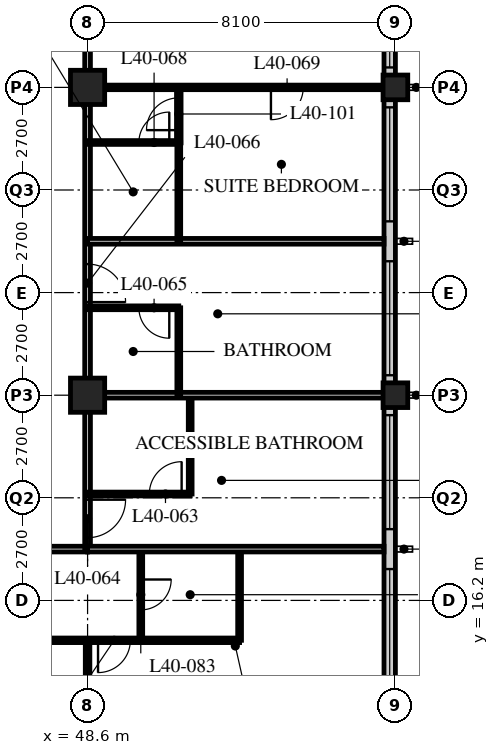
"""IFC4 building model, lengths in metres.
Left out: names, types, materials, properties, quantities, classifications, styles, units other than length and angle.
Written with IfcOpenShell. Run it as: python <this file> out.ifc"""

import sys

from ifc_helpers import new_model, si_unit, direction, frame, frame_2d, origin, origin_2d, place, context, subcontext, project, spatial, rectangle, hollow_rectangle, extrude, element, fill, save


model = new_model("IFC4")
c1 = context("Model", 3, precision=1e-05, world=origin(), true_north=direction((0.0, 1.0)))
c2 = subcontext(c1, "Body", "Model", "MODEL_VIEW")
j1 = project(units=[si_unit("LENGTHUNIT", "METRE"), si_unit("PLANEANGLEUNIT", "RADIAN")], contexts=[c1])
p1 = place(None, origin())
s1 = spatial("IfcSite", under=j1, at=p1, CompositionType="ELEMENT")
p2 = place(p1, origin())
s2 = spatial("IfcBuilding", under=s1, at=p2, CompositionType="ELEMENT")
p3 = place(p2, frame((0.0, 0.0, 154.4)))
s3 = spatial("IfcBuildingStorey", under=s2, at=p3, CompositionType="ELEMENT", Elevation=154.4)
for number, where, z_axis, x_axis in (
    (1, (48.6, 21.6, 0.0), (0.0, 0.0, 1.0), (1.0, 0.0, 0.0)),
    (2, (48.6, 29.7, 0.0), (0.0, 0.0, 1.0), (1.0, 0.0, 0.0)),
):
    element("IfcColumn", number, at=place(p3, frame(where, z_axis=z_axis, x_axis=x_axis)), inside=s3, PredefinedType="COLUMN", context=c2, shape_type="SweptSolid", body=[
        extrude(hollow_rectangle(XDim=0.9, YDim=0.9, WallThickness=0.1, at=origin_2d()), origin(), (0.0, 0.0, 1.0), 3.4),
    ])
for number, where, z_axis, x_axis in (
    (3, (56.7, 21.6, 0.0), (0.0, 0.0, 1.0), (1.0, 0.0, 0.0)),
    (4, (56.7, 29.7, 0.0), (0.0, 0.0, 1.0), (1.0, 0.0, 0.0)),
):
    element("IfcColumn", number, at=place(p3, frame(where, z_axis=z_axis, x_axis=x_axis)), inside=s3, PredefinedType="COLUMN", context=c2, shape_type="SweptSolid", body=[
        extrude(hollow_rectangle(XDim=0.65, YDim=0.65, WallThickness=0.055, at=origin_2d()), origin(), (0.0, 0.0, 1.0), 3.4),
    ])
p4 = place(p3, frame((56.55, 13.8, 0.0), z_axis=(0.0, 0.0, 1.0), x_axis=(0.0, 1.0, 0.0)))
e5 = element("IfcWall", 5, at=p4, inside=s3, PredefinedType="SOLIDWALL", context=c2, shape_type="SweptSolid", body=[
    extrude(rectangle(XDim=32.1, YDim=0.3, at=frame_2d((16.05, 0.0))), origin(), (0.0, 0.0, 1.0), 2.15),
])
p5 = place(p4, frame((0.225, 0.0, 0.9)))
e6 = element("IfcOpeningElement", 6, at=p5, cuts=e5, PredefinedType="OPENING", context=c2, shape_type="SweptSolid", body=[
    extrude(rectangle(XDim=3.0, YDim=1.2, at=frame_2d((1.5, 0.6))), frame((0.0, 0.16, 0.0), z_axis=(0.0, -1.0, 0.0), x_axis=(1.0, 0.0, 0.0)), (0.0, 0.0, 1.0), 0.32),
])
p6 = place(p4, frame((4.275, 0.0, 0.9)))
e7 = element("IfcOpeningElement", 7, at=p6, cuts=e5, PredefinedType="OPENING", context=c2, shape_type="SweptSolid", body=[
    extrude(rectangle(XDim=3.0, YDim=1.2, at=frame_2d((1.5, 0.6))), frame((0.0, 0.16, 0.0), z_axis=(0.0, -1.0, 0.0), x_axis=(1.0, 0.0, 0.0)), (0.0, 0.0, 1.0), 0.32),
])
p7 = place(p4, frame((8.325, 0.0, 0.9)))
e8 = element("IfcOpeningElement", 8, at=p7, cuts=e5, PredefinedType="OPENING", context=c2, shape_type="SweptSolid", body=[
    extrude(rectangle(XDim=3.0, YDim=1.2, at=frame_2d((1.5, 0.6))), frame((0.0, 0.16, 0.0), z_axis=(0.0, -1.0, 0.0), x_axis=(1.0, 0.0, 0.0)), (0.0, 0.0, 1.0), 0.32),
])
p8 = place(p4, frame((12.375, 0.0, 0.9)))
e9 = element("IfcOpeningElement", 9, at=p8, cuts=e5, PredefinedType="OPENING", context=c2, shape_type="SweptSolid", body=[
    extrude(rectangle(XDim=3.0, YDim=1.2, at=frame_2d((1.5, 0.6))), frame((0.0, 0.16, 0.0), z_axis=(0.0, -1.0, 0.0), x_axis=(1.0, 0.0, 0.0)), (0.0, 0.0, 1.0), 0.32),
])
p9 = place(p4, frame((16.425, 0.0, 0.9)))
e10 = element("IfcOpeningElement", 10, at=p9, cuts=e5, PredefinedType="OPENING", context=c2, shape_type="SweptSolid", body=[
    extrude(rectangle(XDim=3.0, YDim=1.2, at=frame_2d((1.5, 0.6))), frame((0.0, 0.16, 0.0), z_axis=(0.0, -1.0, 0.0), x_axis=(1.0, 0.0, 0.0)), (0.0, 0.0, 1.0), 0.32),
])
p10 = place(p4, frame((20.475, 0.0, 0.9)))
e11 = element("IfcOpeningElement", 11, at=p10, cuts=e5, PredefinedType="OPENING", context=c2, shape_type="SweptSolid", body=[
    extrude(rectangle(XDim=3.0, YDim=1.2, at=frame_2d((1.5, 0.6))), frame((0.0, 0.16, 0.0), z_axis=(0.0, -1.0, 0.0), x_axis=(1.0, 0.0, 0.0)), (0.0, 0.0, 1.0), 0.32),
])
p11 = place(p4, frame((24.525, 0.0, 0.9)))
e12 = element("IfcOpeningElement", 12, at=p11, cuts=e5, PredefinedType="OPENING", context=c2, shape_type="SweptSolid", body=[
    extrude(rectangle(XDim=3.0, YDim=1.2, at=frame_2d((1.5, 0.6))), frame((0.0, 0.16, 0.0), z_axis=(0.0, -1.0, 0.0), x_axis=(1.0, 0.0, 0.0)), (0.0, 0.0, 1.0), 0.32),
])
p12 = place(p4, frame((28.575, 0.0, 0.9)))
e13 = element("IfcOpeningElement", 13, at=p12, cuts=e5, PredefinedType="OPENING", context=c2, shape_type="SweptSolid", body=[
    extrude(rectangle(XDim=3.0, YDim=1.2, at=frame_2d((1.5, 0.6))), frame((0.0, 0.16, 0.0), z_axis=(0.0, -1.0, 0.0), x_axis=(1.0, 0.0, 0.0)), (0.0, 0.0, 1.0), 0.32),
])
p13 = place(p3, frame((8.1, 17.55, 0.0), z_axis=(0.0, 0.0, 1.0), x_axis=(1.0, 0.0, 0.0)))
e14 = element("IfcWall", 14, at=p13, inside=s3, PredefinedType="PARTITIONING", context=c2, shape_type="SweptSolid", body=[
    extrude(rectangle(XDim=40.5, YDim=0.15, at=frame_2d((20.25, 0.0))), origin(), (0.0, 0.0, 1.0), 3.15),
])
p14 = place(p13, frame((10.0, 0.0, 0.0)))
e15 = element("IfcOpeningElement", 15, at=p14, cuts=e14, PredefinedType="OPENING", context=c2, shape_type="SweptSolid", body=[
    extrude(rectangle(XDim=1.0, YDim=2.1, at=frame_2d((0.5, 1.05))), frame((0.0, 0.085, 0.0), z_axis=(0.0, -1.0, 0.0), x_axis=(1.0, 0.0, 0.0)), (0.0, 0.0, 1.0), 0.17),
])
p15 = place(p13, frame((22.15, 0.0, 0.0)))
e16 = element("IfcOpeningElement", 16, at=p15, cuts=e14, PredefinedType="OPENING", context=c2, shape_type="SweptSolid", body=[
    extrude(rectangle(XDim=1.0, YDim=2.1, at=frame_2d((0.5, 1.05))), frame((0.0, 0.085, 0.0), z_axis=(0.0, -1.0, 0.0), x_axis=(1.0, 0.0, 0.0)), (0.0, 0.0, 1.0), 0.17),
])
p16 = place(p13, frame((30.8, 0.0, 0.0)))
e17 = element("IfcOpeningElement", 17, at=p16, cuts=e14, PredefinedType="OPENING", context=c2, shape_type="SweptSolid", body=[
    extrude(rectangle(XDim=1.0, YDim=2.1, at=frame_2d((0.5, 1.05))), frame((0.0, 0.085, 0.0), z_axis=(0.0, -1.0, 0.0), x_axis=(1.0, 0.0, 0.0)), (0.0, 0.0, 1.0), 0.17),
])
p17 = place(p13, frame((34.85, 0.0, 0.0)))
e18 = element("IfcOpeningElement", 18, at=p17, cuts=e14, PredefinedType="OPENING", context=c2, shape_type="SweptSolid", body=[
    extrude(rectangle(XDim=1.0, YDim=2.1, at=frame_2d((0.5, 1.05))), frame((0.0, 0.085, 0.0), z_axis=(0.0, -1.0, 0.0), x_axis=(1.0, 0.0, 0.0)), (0.0, 0.0, 1.0), 0.17),
])
p18 = place(p13, frame((1.525, 0.0, 0.0)))
e19 = element("IfcOpeningElement", 19, at=p18, cuts=e14, PredefinedType="OPENING", context=c2, shape_type="SweptSolid", body=[
    extrude(rectangle(XDim=1.0, YDim=2.1, at=frame_2d((0.5, 1.05))), frame((0.0, 0.085, 0.0), z_axis=(0.0, -1.0, 0.0), x_axis=(1.0, 0.0, 0.0)), (0.0, 0.0, 1.0), 0.17),
])
p19 = place(p13, frame((37.975, 0.0, 0.0)))
e20 = element("IfcOpeningElement", 20, at=p19, cuts=e14, PredefinedType="OPENING", context=c2, shape_type="SweptSolid", body=[
    extrude(rectangle(XDim=1.0, YDim=2.1, at=frame_2d((0.5, 1.05))), frame((0.0, 0.085, 0.0), z_axis=(0.0, -1.0, 0.0), x_axis=(1.0, 0.0, 0.0)), (0.0, 0.0, 1.0), 0.17),
])
p20 = place(p3, frame((48.6, 17.55, 0.0), z_axis=(0.0, 0.0, 1.0), x_axis=(0.0, 1.0, 0.0)))
e21 = element("IfcWall", 21, at=p20, inside=s3, PredefinedType="PARTITIONING", context=c2, shape_type="SweptSolid", body=[
    extrude(rectangle(XDim=28.35, YDim=0.15, at=frame_2d((14.175, 0.0))), origin(), (0.0, 0.0, 1.0), 2.15),
])
p21 = place(p20, frame((0.3, 0.0, 0.0)))
e22 = element("IfcOpeningElement", 22, at=p21, cuts=e21, PredefinedType="OPENING", context=c2, shape_type="SweptSolid", body=[
    extrude(rectangle(XDim=1.0, YDim=2.1, at=frame_2d((0.5, 1.05))), frame((0.0, 0.085, 0.0), z_axis=(0.0, -1.0, 0.0), x_axis=(1.0, 0.0, 0.0)), (0.0, 0.0, 1.0), 0.17),
])
p22 = place(p20, frame((6.5, 0.0, 0.0)))
e23 = element("IfcOpeningElement", 23, at=p22, cuts=e21, PredefinedType="OPENING", context=c2, shape_type="SweptSolid", body=[
    extrude(rectangle(XDim=1.0, YDim=2.1, at=frame_2d((0.5, 1.05))), frame((0.0, 0.085, 0.0), z_axis=(0.0, -1.0, 0.0), x_axis=(1.0, 0.0, 0.0)), (0.0, 0.0, 1.0), 0.17),
])
p23 = place(p20, frame((13.675, 0.0, 0.0)))
e24 = element("IfcOpeningElement", 24, at=p23, cuts=e21, PredefinedType="OPENING", context=c2, shape_type="SweptSolid", body=[
    extrude(rectangle(XDim=1.0, YDim=2.1, at=frame_2d((0.5, 1.05))), frame((0.0, 0.085, 0.0), z_axis=(0.0, -1.0, 0.0), x_axis=(1.0, 0.0, 0.0)), (0.0, 0.0, 1.0), 0.17),
])
p24 = place(p20, frame((22.7, 0.0, 0.0)))
e25 = element("IfcOpeningElement", 25, at=p24, cuts=e21, PredefinedType="OPENING", context=c2, shape_type="SweptSolid", body=[
    extrude(rectangle(XDim=1.0, YDim=2.1, at=frame_2d((0.5, 1.05))), frame((0.0, 0.085, 0.0), z_axis=(0.0, -1.0, 0.0), x_axis=(1.0, 0.0, 0.0)), (0.0, 0.0, 1.0), 0.17),
])
p25 = place(p20, frame((24.9, 0.0, 0.0)))
e26 = element("IfcOpeningElement", 26, at=p25, cuts=e21, PredefinedType="OPENING", context=c2, shape_type="SweptSolid", body=[
    extrude(rectangle(XDim=1.0, YDim=2.1, at=frame_2d((0.5, 1.05))), frame((0.0, 0.085, 0.0), z_axis=(0.0, -1.0, 0.0), x_axis=(1.0, 0.0, 0.0)), (0.0, 0.0, 1.0), 0.17),
])
p26 = place(p3, frame((51.3, 19.0, 0.0), z_axis=(0.0, 0.0, 1.0), x_axis=(0.0, 1.0, 0.0)))
e27 = element("IfcWall", 27, at=p26, inside=s3, PredefinedType="PARTITIONING", context=c2, shape_type="SweptSolid", body=[
    extrude(rectangle(XDim=2.6, YDim=0.1, at=frame_2d((1.3, 0.0))), origin(), (0.0, 0.0, 1.0), 3.15),
])
p27 = place(p3, frame((48.6, 19.0, 0.0), z_axis=(0.0, 0.0, 1.0), x_axis=(1.0, 0.0, 0.0)))
e28 = element("IfcWall", 28, at=p27, inside=s3, PredefinedType="PARTITIONING", context=c2, shape_type="SweptSolid", body=[
    extrude(rectangle(XDim=2.7, YDim=0.1, at=frame_2d((1.35, 0.0))), origin(), (0.0, 0.0, 1.0), 3.15),
])
p28 = place(p27, frame((1.625, 0.0, 0.0)))
e29 = element("IfcOpeningElement", 29, at=p28, cuts=e28, PredefinedType="OPENING", context=c2, shape_type="SweptSolid", body=[
    extrude(rectangle(XDim=0.85, YDim=2.1, at=frame_2d((0.425, 1.05))), frame((0.0, 0.06, 0.0), z_axis=(0.0, -1.0, 0.0), x_axis=(1.0, 0.0, 0.0)), (0.0, 0.0, 1.0), 0.12),
])
p29 = place(p3, frame((48.6, 21.6, 0.0), z_axis=(0.0, 0.0, 1.0), x_axis=(1.0, 0.0, 0.0)))
e30 = element("IfcWall", 30, at=p29, inside=s3, PredefinedType="PARTITIONING", context=c2, shape_type="SweptSolid", body=[
    extrude(rectangle(XDim=7.8, YDim=0.15, at=frame_2d((3.9, 0.0))), origin(), (0.0, 0.0, 1.0), 2.15),
])
p30 = place(p3, frame((51.0, 21.6, 0.0), z_axis=(0.0, 0.0, 1.0), x_axis=(0.0, 1.0, 0.0)))
e31 = element("IfcWall", 31, at=p30, inside=s3, PredefinedType="PARTITIONING", context=c2, shape_type="SweptSolid", body=[
    extrude(rectangle(XDim=2.3, YDim=0.1, at=frame_2d((1.15, 0.0))), origin(), (0.0, 0.0, 1.0), 3.15),
])
p31 = place(p3, frame((48.6, 23.9, 0.0), z_axis=(0.0, 0.0, 1.0), x_axis=(1.0, 0.0, 0.0)))
e32 = element("IfcWall", 32, at=p31, inside=s3, PredefinedType="PARTITIONING", context=c2, shape_type="SweptSolid", body=[
    extrude(rectangle(XDim=2.4, YDim=0.1, at=frame_2d((1.2, 0.0))), origin(), (0.0, 0.0, 1.0), 3.15),
])
p32 = place(p31, frame((1.35, 0.0, 0.0)))
e33 = element("IfcOpeningElement", 33, at=p32, cuts=e32, PredefinedType="OPENING", context=c2, shape_type="SweptSolid", body=[
    extrude(rectangle(XDim=0.8, YDim=2.1, at=frame_2d((0.4, 1.05))), frame((0.0, 0.06, 0.0), z_axis=(0.0, -1.0, 0.0), x_axis=(1.0, 0.0, 0.0)), (0.0, 0.0, 1.0), 0.12),
])
p33 = place(p3, frame((48.6, 25.65, 0.0), z_axis=(0.0, 0.0, 1.0), x_axis=(1.0, 0.0, 0.0)))
e34 = element("IfcWall", 34, at=p33, inside=s3, PredefinedType="PARTITIONING", context=c2, shape_type="SweptSolid", body=[
    extrude(rectangle(XDim=7.8, YDim=0.15, at=frame_2d((3.9, 0.0))), origin(), (0.0, 0.0, 1.0), 3.15),
])
p34 = place(p3, frame((51.0, 25.65, 0.0), z_axis=(0.0, 0.0, 1.0), x_axis=(0.0, 1.0, 0.0)))
e35 = element("IfcWall", 35, at=p34, inside=s3, PredefinedType="PARTITIONING", context=c2, shape_type="SweptSolid", body=[
    extrude(rectangle(XDim=2.6, YDim=0.1, at=frame_2d((1.3, 0.0))), origin(), (0.0, 0.0, 1.0), 3.15),
])
p35 = place(p3, frame((48.6, 28.25, 0.0), z_axis=(0.0, 0.0, 1.0), x_axis=(1.0, 0.0, 0.0)))
e36 = element("IfcWall", 36, at=p35, inside=s3, PredefinedType="PARTITIONING", context=c2, shape_type="SweptSolid", body=[
    extrude(rectangle(XDim=2.4, YDim=0.1, at=frame_2d((1.2, 0.0))), origin(), (0.0, 0.0, 1.0), 3.15),
])
p36 = place(p35, frame((1.35, 0.0, 0.0)))
e37 = element("IfcOpeningElement", 37, at=p36, cuts=e36, PredefinedType="OPENING", context=c2, shape_type="SweptSolid", body=[
    extrude(rectangle(XDim=0.8, YDim=2.1, at=frame_2d((0.4, 1.05))), frame((0.0, 0.06, 0.0), z_axis=(0.0, -1.0, 0.0), x_axis=(1.0, 0.0, 0.0)), (0.0, 0.0, 1.0), 0.12),
])
p37 = place(p3, frame((48.6, 29.7, 0.0), z_axis=(0.0, 0.0, 1.0), x_axis=(1.0, 0.0, 0.0)))
e38 = element("IfcWall", 38, at=p37, inside=s3, PredefinedType="PARTITIONING", context=c2, shape_type="SweptSolid", body=[
    extrude(rectangle(XDim=7.8, YDim=0.12, at=frame_2d((3.9, 0.0))), origin(), (0.0, 0.0, 1.0), 2.38),
])
p38 = place(p37, frame((4.825, 0.0, 0.0)))
e39 = element("IfcOpeningElement", 39, at=p38, cuts=e38, PredefinedType="OPENING", context=c2, shape_type="SweptSolid", body=[
    extrude(rectangle(XDim=0.85, YDim=2.1, at=frame_2d((0.425, 1.05))), frame((0.0, 0.07, 0.0), z_axis=(0.0, -1.0, 0.0), x_axis=(1.0, 0.0, 0.0)), (0.0, 0.0, 1.0), 0.14),
])
p39 = place(p3, frame((44.55, 15.15, 0.0), z_axis=(0.0, 0.0, 1.0), x_axis=(1.0, 0.0, 0.0)))
e40 = element("IfcWall", 40, at=p39, inside=s3, PredefinedType="PARTITIONING", context=c2, shape_type="SweptSolid", body=[
    extrude(rectangle(XDim=8.05, YDim=0.12, at=frame_2d((4.025, 0.0))), origin(), (0.0, 0.0, 1.0), 3.15),
])
p40 = place(p39, frame((0.475, 0.0, 0.0)))
e41 = element("IfcOpeningElement", 41, at=p40, cuts=e40, PredefinedType="OPENING", context=c2, shape_type="SweptSolid", body=[
    extrude(rectangle(XDim=0.85, YDim=2.1, at=frame_2d((0.425, 1.05))), frame((0.0, 0.07, 0.0), z_axis=(0.0, -1.0, 0.0), x_axis=(1.0, 0.0, 0.0)), (0.0, 0.0, 1.0), 0.14),
])
p41 = place(p39, frame((4.325, 0.0, 0.0)))
e42 = element("IfcOpeningElement", 42, at=p41, cuts=e40, PredefinedType="OPENING", context=c2, shape_type="SweptSolid", body=[
    extrude(rectangle(XDim=0.85, YDim=2.1, at=frame_2d((0.425, 1.05))), frame((0.0, 0.07, 0.0), z_axis=(0.0, -1.0, 0.0), x_axis=(1.0, 0.0, 0.0)), (0.0, 0.0, 1.0), 0.14),
])
p42 = place(p3, frame((50.0, 17.55, 0.0), z_axis=(0.0, 0.0, 1.0), x_axis=(0.0, -1.0, 0.0)))
e43 = element("IfcWall", 43, at=p42, inside=s3, PredefinedType="PARTITIONING", context=c2, shape_type="SweptSolid", body=[
    extrude(rectangle(XDim=2.4, YDim=0.1, at=frame_2d((1.2, 0.0))), origin(), (0.0, 0.0, 1.0), 3.15),
])
p43 = place(p42, frame((0.8, 0.0, 0.0)))
e44 = element("IfcOpeningElement", 44, at=p43, cuts=e43, PredefinedType="OPENING", context=c2, shape_type="SweptSolid", body=[
    extrude(rectangle(XDim=0.8, YDim=2.1, at=frame_2d((0.4, 1.05))), frame((0.0, 0.06, 0.0), z_axis=(0.0, -1.0, 0.0), x_axis=(1.0, 0.0, 0.0)), (0.0, 0.0, 1.0), 0.12),
])
p44 = place(p3, frame((52.6, 17.55, 0.0), z_axis=(0.0, 0.0, 1.0), x_axis=(0.0, -1.0, 0.0)))
e45 = element("IfcWall", 45, at=p44, inside=s3, PredefinedType="PARTITIONING", context=c2, shape_type="SweptSolid", body=[
    extrude(rectangle(XDim=2.4, YDim=0.1, at=frame_2d((1.2, 0.0))), origin(), (0.0, 0.0, 1.0), 3.15),
])
p45 = place(p3, frame((48.6, 15.15, 0.0), z_axis=(0.0, 0.0, 1.0), x_axis=(0.0, -1.0, 0.0)))
e46 = element("IfcWall", 46, at=p45, inside=s3, PredefinedType="PARTITIONING", context=c2, shape_type="SweptSolid", body=[
    extrude(rectangle(XDim=5.4, YDim=0.12, at=frame_2d((2.7, 0.0))), origin(), (0.0, 0.0, 1.0), 2.15),
])
p46 = place(p3, frame((48.6, 17.55, 0.0), z_axis=(0.0, 0.0, 1.0), x_axis=(1.0, 0.0, 0.0)))
e47 = element("IfcWall", 47, at=p46, inside=s3, PredefinedType="PARTITIONING", context=c2, shape_type="SweptSolid", body=[
    extrude(rectangle(XDim=7.8, YDim=0.15, at=frame_2d((3.9, 0.0))), origin(), (0.0, 0.0, 1.0), 3.15),
])
p47 = place(p3, frame((51.0, 29.7, 0.0), z_axis=(0.0, 0.0, 1.0), x_axis=(0.0, -1.0, 0.0)))
e48 = element("IfcWall", 48, at=p47, inside=s3, PredefinedType="PARTITIONING", context=c2, shape_type="SweptSolid", body=[
    extrude(rectangle(XDim=1.46, YDim=0.12, at=frame_2d((0.73, 0.0))), origin(), (0.0, 0.0, 1.0), 3.15),
])
p48 = place(p47, frame((0.275, 0.0, 0.0)))
e49 = element("IfcOpeningElement", 49, at=p48, cuts=e48, PredefinedType="OPENING", context=c2, shape_type="SweptSolid", body=[
    extrude(rectangle(XDim=0.85, YDim=2.1, at=frame_2d((0.425, 1.05))), frame((0.0, 0.07, 0.0), z_axis=(0.0, -1.0, 0.0), x_axis=(1.0, 0.0, 0.0)), (0.0, 0.0, 1.0), 0.14),
])
p49 = place(p5, origin())
e50 = element("IfcWindow", 50, at=p49, inside=s3, PartitioningType="SINGLE_PANEL", PredefinedType="WINDOW", context=c2, shape_type="SweptSolid", body=[
    extrude(rectangle(XDim=3.0, YDim=1.2, at=frame_2d((1.5, 0.6))), frame((0.0, 0.03, 0.0), z_axis=(0.0, -1.0, 0.0), x_axis=(1.0, 0.0, 0.0)), (0.0, 0.0, 1.0), 0.06),
])
fill(e6, e50)
p50 = place(p6, origin())
e51 = element("IfcWindow", 51, at=p50, inside=s3, PartitioningType="SINGLE_PANEL", PredefinedType="WINDOW", context=c2, shape_type="SweptSolid", body=[
    extrude(rectangle(XDim=3.0, YDim=1.2, at=frame_2d((1.5, 0.6))), frame((0.0, 0.03, 0.0), z_axis=(0.0, -1.0, 0.0), x_axis=(1.0, 0.0, 0.0)), (0.0, 0.0, 1.0), 0.06),
])
fill(e7, e51)
p51 = place(p7, origin())
e52 = element("IfcWindow", 52, at=p51, inside=s3, PartitioningType="SINGLE_PANEL", PredefinedType="WINDOW", context=c2, shape_type="SweptSolid", body=[
    extrude(rectangle(XDim=3.0, YDim=1.2, at=frame_2d((1.5, 0.6))), frame((0.0, 0.03, 0.0), z_axis=(0.0, -1.0, 0.0), x_axis=(1.0, 0.0, 0.0)), (0.0, 0.0, 1.0), 0.06),
])
fill(e8, e52)
p52 = place(p8, origin())
e53 = element("IfcWindow", 53, at=p52, inside=s3, PartitioningType="SINGLE_PANEL", PredefinedType="WINDOW", context=c2, shape_type="SweptSolid", body=[
    extrude(rectangle(XDim=3.0, YDim=1.2, at=frame_2d((1.5, 0.6))), frame((0.0, 0.03, 0.0), z_axis=(0.0, -1.0, 0.0), x_axis=(1.0, 0.0, 0.0)), (0.0, 0.0, 1.0), 0.06),
])
fill(e9, e53)
p53 = place(p9, origin())
e54 = element("IfcWindow", 54, at=p53, inside=s3, PartitioningType="SINGLE_PANEL", PredefinedType="WINDOW", context=c2, shape_type="SweptSolid", body=[
    extrude(rectangle(XDim=3.0, YDim=1.2, at=frame_2d((1.5, 0.6))), frame((0.0, 0.03, 0.0), z_axis=(0.0, -1.0, 0.0), x_axis=(1.0, 0.0, 0.0)), (0.0, 0.0, 1.0), 0.06),
])
fill(e10, e54)
p54 = place(p28, origin())
e55 = element("IfcDoor", 55, at=p54, inside=s3, OperationType="SINGLE_SWING_RIGHT", PredefinedType="DOOR", context=c2, shape_type="SweptSolid", body=[
    extrude(rectangle(XDim=0.85, YDim=2.1, at=frame_2d((0.425, 1.05))), frame((0.0, 0.025, 0.0), z_axis=(0.0, -1.0, 0.0), x_axis=(1.0, 0.0, 0.0)), (0.0, 0.0, 1.0), 0.05),
])
fill(e29, e55)
p55 = place(p21, origin())
e56 = element("IfcDoor", 56, at=p55, inside=s3, OperationType="SINGLE_SWING_LEFT", PredefinedType="DOOR", context=c2, shape_type="SweptSolid", body=[
    extrude(rectangle(XDim=1.0, YDim=2.1, at=frame_2d((0.5, 1.05))), frame((0.0, 0.025, 0.0), z_axis=(0.0, -1.0, 0.0), x_axis=(1.0, 0.0, 0.0)), (0.0, 0.0, 1.0), 0.05),
])
fill(e22, e56)
p56 = place(p32, origin())
e57 = element("IfcDoor", 57, at=p56, inside=s3, OperationType="SINGLE_SWING_LEFT", PredefinedType="DOOR", context=c2, shape_type="SweptSolid", body=[
    extrude(rectangle(XDim=0.8, YDim=2.1, at=frame_2d((0.4, 1.05))), frame((0.0, 0.025, 0.0), z_axis=(0.0, -1.0, 0.0), x_axis=(1.0, 0.0, 0.0)), (0.0, 0.0, 1.0), 0.05),
])
fill(e33, e57)
p57 = place(p22, origin())
e58 = element("IfcDoor", 58, at=p57, inside=s3, OperationType="SINGLE_SWING_RIGHT", PredefinedType="DOOR", context=c2, shape_type="SweptSolid", body=[
    extrude(rectangle(XDim=1.0, YDim=2.1, at=frame_2d((0.5, 1.05))), frame((0.0, 0.025, 0.0), z_axis=(0.0, -1.0, 0.0), x_axis=(1.0, 0.0, 0.0)), (0.0, 0.0, 1.0), 0.05),
])
fill(e23, e58)
p58 = place(p36, origin())
e59 = element("IfcDoor", 59, at=p58, inside=s3, OperationType="SINGLE_SWING_RIGHT", PredefinedType="DOOR", context=c2, shape_type="SweptSolid", body=[
    extrude(rectangle(XDim=0.8, YDim=2.1, at=frame_2d((0.4, 1.05))), frame((0.0, 0.025, 0.0), z_axis=(0.0, -1.0, 0.0), x_axis=(1.0, 0.0, 0.0)), (0.0, 0.0, 1.0), 0.05),
])
fill(e37, e59)
p59 = place(p38, origin())
e60 = element("IfcDoor", 60, at=p59, inside=s3, OperationType="SINGLE_SWING_RIGHT", PredefinedType="DOOR", context=c2, shape_type="SweptSolid", body=[
    extrude(rectangle(XDim=0.85, YDim=2.1, at=frame_2d((0.425, 1.05))), frame((0.0, 0.025, 0.0), z_axis=(0.0, -1.0, 0.0), x_axis=(1.0, 0.0, 0.0)), (0.0, 0.0, 1.0), 0.05),
])
fill(e39, e60)
p60 = place(p43, origin())
e61 = element("IfcDoor", 61, at=p60, inside=s3, OperationType="SINGLE_SWING_LEFT", PredefinedType="DOOR", context=c2, shape_type="SweptSolid", body=[
    extrude(rectangle(XDim=0.8, YDim=2.1, at=frame_2d((0.4, 1.05))), frame((0.0, 0.025, 0.0), z_axis=(0.0, -1.0, 0.0), x_axis=(1.0, 0.0, 0.0)), (0.0, 0.0, 1.0), 0.05),
])
fill(e44, e61)
p61 = place(p41, origin())
e62 = element("IfcDoor", 62, at=p61, inside=s3, OperationType="SINGLE_SWING_RIGHT", PredefinedType="DOOR", context=c2, shape_type="SweptSolid", body=[
    extrude(rectangle(XDim=0.85, YDim=2.1, at=frame_2d((0.425, 1.05))), frame((0.0, 0.025, 0.0), z_axis=(0.0, -1.0, 0.0), x_axis=(1.0, 0.0, 0.0)), (0.0, 0.0, 1.0), 0.05),
])
fill(e42, e62)
p62 = place(p48, origin())
e63 = element("IfcDoor", 63, at=p62, inside=s3, OperationType="SINGLE_SWING_LEFT", PredefinedType="DOOR", context=c2, shape_type="SweptSolid", body=[
    extrude(rectangle(XDim=0.85, YDim=2.1, at=frame_2d((0.425, 1.05))), frame((0.0, 0.025, 0.0), z_axis=(0.0, -1.0, 0.0), x_axis=(1.0, 0.0, 0.0)), (0.0, 0.0, 1.0), 0.05),
])
fill(e49, e63)
save(model, sys.argv[1])
